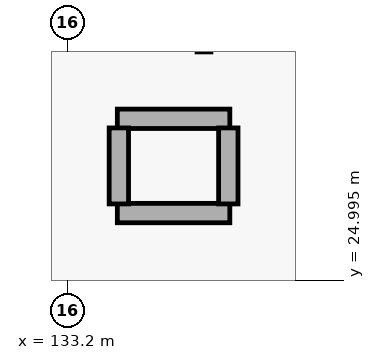
"""IFC4 building model, lengths in metres.
Left out: names, types, materials, properties, quantities, classifications, styles, units other than length and angle.
Written with IfcOpenShell. Run it as: python <this file> out.ifc"""

import sys

from ifc_helpers import new_model, si_unit, direction, frame, frame_2d, origin, place, context, subcontext, project, spatial, rectangle, extrude, element, save


model = new_model("IFC4")
c1 = context("Model", 3, precision=1e-05, world=origin(), true_north=direction((0.0, 1.0)))
c2 = subcontext(c1, "Body", "Model", "MODEL_VIEW")
j1 = project(units=[si_unit("LENGTHUNIT", "METRE"), si_unit("PLANEANGLEUNIT", "RADIAN")], contexts=[c1])
p1 = place(None, origin())
s1 = spatial("IfcSite", under=j1, at=p1, CompositionType="ELEMENT")
p2 = place(p1, origin())
s2 = spatial("IfcBuilding", under=s1, at=p2, CompositionType="ELEMENT")
p3 = place(p2, frame((0.0, 0.0, 15.6)))
s3 = spatial("IfcBuildingStorey", under=s2, at=p3, CompositionType="ELEMENT", Elevation=15.6)
for number, where, z_axis, x_axis in (
    (1, (133.86, 27.12, 0.0), (0.0, 0.0, 1.0), (1.0, 0.0, 0.0)),
    (2, (133.86, 25.88, 0.0), (0.0, 0.0, 1.0), (1.0, 0.0, 0.0)),
):
    element("IfcWall", number, at=place(p3, frame(where, z_axis=z_axis, x_axis=x_axis)), inside=s3, PredefinedType="PARTITIONING", context=c2, shape_type="SweptSolid", body=[
        extrude(rectangle(XDim=1.48, YDim=0.255, at=frame_2d((0.74, 0.0))), origin(), (0.0, 0.0, 1.0), 4.72),
    ])
for number, where, z_axis, x_axis in (
    (3, (133.88, 26.0, 0.0), (0.0, 0.0, 1.0), (0.0, 1.0, 0.0)),
    (4, (135.32, 26.0, 0.0), (0.0, 0.0, 1.0), (0.0, 1.0, 0.0)),
):
    element("IfcWall", number, at=place(p3, frame(where, z_axis=z_axis, x_axis=x_axis)), inside=s3, PredefinedType="PARTITIONING", context=c2, shape_type="SweptSolid", body=[
        extrude(rectangle(XDim=1.0, YDim=0.255, at=frame_2d((0.5, 0.0))), origin(), (0.0, 0.0, 1.0), 4.72),
    ])
save(model, sys.argv[1])
